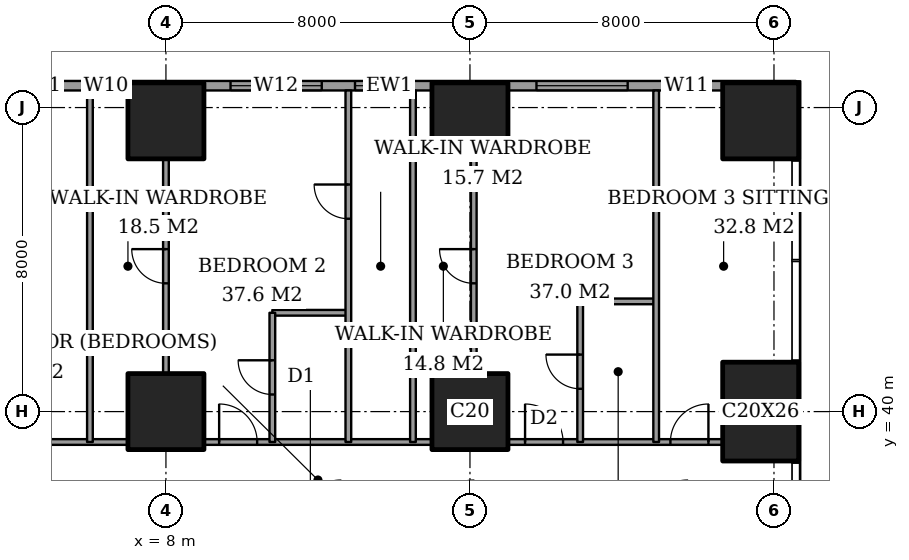
"""IFC4 building model, lengths in metres.
Left out: names, types, materials, properties, quantities, classifications, styles, units other than length and angle.
Written with IfcOpenShell. Run it as: python <this file> out.ifc"""

import sys

from ifc_helpers import new_model, si_unit, direction, frame, frame_2d, origin, origin_2d, place, context, subcontext, project, spatial, rectangle, extrude, element, fill, save


model = new_model("IFC4")
c1 = context("Model", 3, precision=1e-05, world=origin(), true_north=direction((0.0, 1.0)))
c2 = subcontext(c1, "Body", "Model", "MODEL_VIEW")
j1 = project(units=[si_unit("LENGTHUNIT", "METRE"), si_unit("PLANEANGLEUNIT", "RADIAN")], contexts=[c1])
p1 = place(None, origin())
s1 = spatial("IfcSite", under=j1, at=p1, CompositionType="ELEMENT")
p2 = place(p1, origin())
s2 = spatial("IfcBuilding", under=s1, at=p2, CompositionType="ELEMENT")
p3 = place(p2, frame((0.0, 0.0, 128.6)))
s3 = spatial("IfcBuildingStorey", under=s2, at=p3, CompositionType="ELEMENT", Elevation=128.6)
for number, where, z_axis, x_axis in (
    (1, (8.0, 40.0, 0.0), (0.0, 0.0, 1.0), (1.0, 0.0, 0.0)),
    (2, (8.0, 47.65, 0.0), (0.0, 0.0, 1.0), (1.0, 0.0, 0.0)),
    (3, (16.0, 40.0, 0.0), (0.0, 0.0, 1.0), (1.0, 0.0, 0.0)),
    (4, (16.0, 47.65, 0.0), (0.0, 0.0, 1.0), (1.0, 0.0, 0.0)),
):
    element("IfcColumn", number, at=place(p3, frame(where, z_axis=z_axis, x_axis=x_axis)), inside=s3, PredefinedType="COLUMN", context=c2, shape_type="SweptSolid", body=[
        extrude(rectangle(XDim=2.0, YDim=2.0, at=origin_2d()), origin(), (0.0, 0.0, 1.0), 3.6),
    ])
p4 = place(p3, frame((23.65, 40.0, 0.0), z_axis=(0.0, 0.0, 1.0), x_axis=(1.0, 0.0, 0.0)))
e5 = element("IfcColumn", 5, at=p4, inside=s3, PredefinedType="COLUMN", context=c2, shape_type="SweptSolid", body=[
    extrude(rectangle(XDim=2.0, YDim=2.6, at=origin_2d()), origin(), (0.0, 0.0, 1.0), 3.6),
])
p5 = place(p3, frame((23.65, 47.65, 0.0), z_axis=(0.0, 0.0, 1.0), x_axis=(1.0, 0.0, 0.0)))
e6 = element("IfcColumn", 6, at=p5, inside=s3, PredefinedType="COLUMN", context=c2, shape_type="SweptSolid", body=[
    extrude(rectangle(XDim=2.0, YDim=2.0, at=origin_2d()), origin(), (0.0, 0.0, 1.0), 3.6),
])
p6 = place(p3, frame((24.575, 48.575, 0.0), z_axis=(0.0, 0.0, 1.0), x_axis=(-1.0, 0.0, 0.0)))
e7 = element("IfcWall", 7, at=p6, inside=s3, PredefinedType="SOLIDWALL", context=c2, shape_type="SweptSolid", body=[
    extrude(rectangle(XDim=21.4, YDim=0.25, at=frame_2d((10.7, 0.0))), origin(), (0.0, 0.0, 1.0), 3.6),
])
p7 = place(p6, frame((2.275, 0.0, 0.4)))
e8 = element("IfcOpeningElement", 8, at=p7, cuts=e7, PredefinedType="OPENING", context=c2, shape_type="SweptSolid", body=[
    extrude(rectangle(XDim=1.2, YDim=2.2, at=frame_2d((0.6, 1.1))), frame((0.0, 0.135, 0.0), z_axis=(0.0, -1.0, 0.0), x_axis=(1.0, 0.0, 0.0)), (0.0, 0.0, 1.0), 0.27),
])
p8 = place(p6, frame((4.425, 0.0, 0.4)))
e9 = element("IfcOpeningElement", 9, at=p8, cuts=e7, PredefinedType="OPENING", context=c2, shape_type="SweptSolid", body=[
    extrude(rectangle(XDim=2.4, YDim=2.2, at=frame_2d((1.2, 1.1))), frame((0.0, 0.135, 0.0), z_axis=(0.0, -1.0, 0.0), x_axis=(1.0, 0.0, 0.0)), (0.0, 0.0, 1.0), 0.27),
])
p9 = place(p6, frame((10.4, 0.0, 0.4)))
e10 = element("IfcOpeningElement", 10, at=p9, cuts=e7, PredefinedType="OPENING", context=c2, shape_type="SweptSolid", body=[
    extrude(rectangle(XDim=1.2, YDim=2.2, at=frame_2d((0.6, 1.1))), frame((0.0, 0.135, 0.0), z_axis=(0.0, -1.0, 0.0), x_axis=(1.0, 0.0, 0.0)), (0.0, 0.0, 1.0), 0.27),
])
p10 = place(p6, frame((12.475, 0.0, 0.4)))
e11 = element("IfcOpeningElement", 11, at=p10, cuts=e7, PredefinedType="OPENING", context=c2, shape_type="SweptSolid", body=[
    extrude(rectangle(XDim=2.4, YDim=2.2, at=frame_2d((1.2, 1.1))), frame((0.0, 0.135, 0.0), z_axis=(0.0, -1.0, 0.0), x_axis=(1.0, 0.0, 0.0)), (0.0, 0.0, 1.0), 0.27),
])
p11 = place(p6, frame((17.85, 0.0, 0.4)))
e12 = element("IfcOpeningElement", 12, at=p11, cuts=e7, PredefinedType="OPENING", context=c2, shape_type="SweptSolid", body=[
    extrude(rectangle(XDim=0.6, YDim=2.2, at=frame_2d((0.3, 1.1))), frame((0.0, 0.135, 0.0), z_axis=(0.0, -1.0, 0.0), x_axis=(1.0, 0.0, 0.0)), (0.0, 0.0, 1.0), 0.27),
])
p12 = place(p6, frame((19.325, 0.0, 0.4)))
e13 = element("IfcOpeningElement", 13, at=p12, cuts=e7, PredefinedType="OPENING", context=c2, shape_type="SweptSolid", body=[
    extrude(rectangle(XDim=1.2, YDim=2.2, at=frame_2d((0.6, 1.1))), frame((0.0, 0.135, 0.0), z_axis=(0.0, -1.0, 0.0), x_axis=(1.0, 0.0, 0.0)), (0.0, 0.0, 1.0), 0.27),
])
p13 = place(p3, frame((1.35, 39.2, 0.0), z_axis=(0.0, 0.0, 1.0), x_axis=(1.0, 0.0, 0.0)))
e14 = element("IfcWall", 14, at=p13, inside=s3, PredefinedType="PARTITIONING", context=c2, shape_type="SweptSolid", body=[
    extrude(rectangle(XDim=5.65, YDim=0.15, at=frame_2d((2.825, 0.0))), origin(), (0.0, 0.0, 1.0), 3.35),
])
p14 = place(p13, frame((1.825, 0.0, 0.0)))
e15 = element("IfcOpeningElement", 15, at=p14, cuts=e14, PredefinedType="OPENING", context=c2, shape_type="SweptSolid", body=[
    extrude(rectangle(XDim=1.0, YDim=2.1, at=frame_2d((0.5, 1.05))), frame((0.0, 0.085, 0.0), z_axis=(0.0, -1.0, 0.0), x_axis=(1.0, 0.0, 0.0)), (0.0, 0.0, 1.0), 0.17),
])
p15 = place(p3, frame((9.0, 39.2, 0.0), z_axis=(0.0, 0.0, 1.0), x_axis=(1.0, 0.0, 0.0)))
e16 = element("IfcWall", 16, at=p15, inside=s3, PredefinedType="PARTITIONING", context=c2, shape_type="SweptSolid", body=[
    extrude(rectangle(XDim=6.0, YDim=0.15, at=frame_2d((3.0, 0.0))), origin(), (0.0, 0.0, 1.0), 3.35),
])
p16 = place(p15, frame((0.4, 0.0, 0.0)))
e17 = element("IfcOpeningElement", 17, at=p16, cuts=e16, PredefinedType="OPENING", context=c2, shape_type="SweptSolid", body=[
    extrude(rectangle(XDim=1.0, YDim=2.1, at=frame_2d((0.5, 1.05))), frame((0.0, 0.085, 0.0), z_axis=(0.0, -1.0, 0.0), x_axis=(1.0, 0.0, 0.0)), (0.0, 0.0, 1.0), 0.17),
])
p17 = place(p3, frame((17.0, 39.2, 0.0), z_axis=(0.0, 0.0, 1.0), x_axis=(1.0, 0.0, 0.0)))
e18 = element("IfcWall", 18, at=p17, inside=s3, PredefinedType="PARTITIONING", context=c2, shape_type="SweptSolid", body=[
    extrude(rectangle(XDim=5.65, YDim=0.15, at=frame_2d((2.825, 0.0))), origin(), (0.0, 0.0, 1.0), 3.35),
])
p18 = place(p17, frame((0.45, 0.0, 0.0)))
e19 = element("IfcOpeningElement", 19, at=p18, cuts=e18, PredefinedType="OPENING", context=c2, shape_type="SweptSolid", body=[
    extrude(rectangle(XDim=1.0, YDim=2.1, at=frame_2d((0.5, 1.05))), frame((0.0, 0.085, 0.0), z_axis=(0.0, -1.0, 0.0), x_axis=(1.0, 0.0, 0.0)), (0.0, 0.0, 1.0), 0.17),
])
p19 = place(p17, frame((4.275, 0.0, 0.0)))
e20 = element("IfcOpeningElement", 20, at=p19, cuts=e18, PredefinedType="OPENING", context=c2, shape_type="SweptSolid", body=[
    extrude(rectangle(XDim=1.0, YDim=2.1, at=frame_2d((0.5, 1.05))), frame((0.0, 0.085, 0.0), z_axis=(0.0, -1.0, 0.0), x_axis=(1.0, 0.0, 0.0)), (0.0, 0.0, 1.0), 0.17),
])
for number, where, z_axis, x_axis in (
    (21, (10.8, 42.6, 0.0), (0.0, 0.0, 1.0), (1.0, 0.0, 0.0)),
    (22, (18.9, 42.9, 0.0), (0.0, 0.0, 1.0), (1.0, 0.0, 0.0)),
):
    element("IfcWall", number, at=place(p3, frame(where, z_axis=z_axis, x_axis=x_axis)), inside=s3, PredefinedType="PARTITIONING", context=c2, shape_type="SweptSolid", body=[
        extrude(rectangle(XDim=2.0, YDim=0.15, at=frame_2d((1.0, 0.0))), origin(), (0.0, 0.0, 1.0), 3.35),
    ])
p20 = place(p3, frame((6.0, 39.2, 0.0), z_axis=(0.0, 0.0, 1.0), x_axis=(0.0, 1.0, 0.0)))
e23 = element("IfcWall", 23, at=p20, inside=s3, PredefinedType="PARTITIONING", context=c2, shape_type="SweptSolid", body=[
    extrude(rectangle(XDim=9.25, YDim=0.15, at=frame_2d((4.625, 0.0))), origin(), (0.0, 0.0, 1.0), 3.35),
])
p21 = place(p3, frame((8.0, 41.0, 0.0), z_axis=(0.0, 0.0, 1.0), x_axis=(0.0, 1.0, 0.0)))
e24 = element("IfcWall", 24, at=p21, inside=s3, PredefinedType="PARTITIONING", context=c2, shape_type="SweptSolid", body=[
    extrude(rectangle(XDim=5.65, YDim=0.15, at=frame_2d((2.825, 0.0))), origin(), (0.0, 0.0, 1.0), 3.35),
])
p22 = place(p21, frame((2.375, 0.0, 0.0)))
e25 = element("IfcOpeningElement", 25, at=p22, cuts=e24, PredefinedType="OPENING", context=c2, shape_type="SweptSolid", body=[
    extrude(rectangle(XDim=0.9, YDim=2.1, at=frame_2d((0.45, 1.05))), frame((0.0, 0.085, 0.0), z_axis=(0.0, -1.0, 0.0), x_axis=(1.0, 0.0, 0.0)), (0.0, 0.0, 1.0), 0.17),
])
p23 = place(p3, frame((10.8, 39.2, 0.0), z_axis=(0.0, 0.0, 1.0), x_axis=(0.0, 1.0, 0.0)))
e26 = element("IfcWall", 26, at=p23, inside=s3, PredefinedType="PARTITIONING", context=c2, shape_type="SweptSolid", body=[
    extrude(rectangle(XDim=3.4, YDim=0.15, at=frame_2d((1.7, 0.0))), origin(), (0.0, 0.0, 1.0), 3.35),
])
p24 = place(p23, frame((1.25, 0.0, 0.0)))
e27 = element("IfcOpeningElement", 27, at=p24, cuts=e26, PredefinedType="OPENING", context=c2, shape_type="SweptSolid", body=[
    extrude(rectangle(XDim=0.9, YDim=2.1, at=frame_2d((0.45, 1.05))), frame((0.0, 0.085, 0.0), z_axis=(0.0, -1.0, 0.0), x_axis=(1.0, 0.0, 0.0)), (0.0, 0.0, 1.0), 0.17),
])
p25 = place(p3, frame((12.8, 39.2, 0.0), z_axis=(0.0, 0.0, 1.0), x_axis=(0.0, 1.0, 0.0)))
e28 = element("IfcWall", 28, at=p25, inside=s3, PredefinedType="PARTITIONING", context=c2, shape_type="SweptSolid", body=[
    extrude(rectangle(XDim=9.25, YDim=0.15, at=frame_2d((4.625, 0.0))), origin(), (0.0, 0.0, 1.0), 3.35),
])
p26 = place(p25, frame((5.875, 0.0, 0.0)))
e29 = element("IfcOpeningElement", 29, at=p26, cuts=e28, PredefinedType="OPENING", context=c2, shape_type="SweptSolid", body=[
    extrude(rectangle(XDim=0.9, YDim=2.1, at=frame_2d((0.45, 1.05))), frame((0.0, 0.085, 0.0), z_axis=(0.0, -1.0, 0.0), x_axis=(1.0, 0.0, 0.0)), (0.0, 0.0, 1.0), 0.17),
])
p27 = place(p3, frame((14.5, 39.2, 0.0), z_axis=(0.0, 0.0, 1.0), x_axis=(0.0, 1.0, 0.0)))
e30 = element("IfcWall", 30, at=p27, inside=s3, PredefinedType="PARTITIONING", context=c2, shape_type="SweptSolid", body=[
    extrude(rectangle(XDim=9.25, YDim=0.15, at=frame_2d((4.625, 0.0))), origin(), (0.0, 0.0, 1.0), 3.35),
])
p28 = place(p3, frame((16.1, 41.0, 0.0), z_axis=(0.0, 0.0, 1.0), x_axis=(0.0, 1.0, 0.0)))
e31 = element("IfcWall", 31, at=p28, inside=s3, PredefinedType="PARTITIONING", context=c2, shape_type="SweptSolid", body=[
    extrude(rectangle(XDim=5.65, YDim=0.15, at=frame_2d((2.825, 0.0))), origin(), (0.0, 0.0, 1.0), 3.35),
])
p29 = place(p28, frame((2.375, 0.0, 0.0)))
e32 = element("IfcOpeningElement", 32, at=p29, cuts=e31, PredefinedType="OPENING", context=c2, shape_type="SweptSolid", body=[
    extrude(rectangle(XDim=0.9, YDim=2.1, at=frame_2d((0.45, 1.05))), frame((0.0, 0.085, 0.0), z_axis=(0.0, -1.0, 0.0), x_axis=(1.0, 0.0, 0.0)), (0.0, 0.0, 1.0), 0.17),
])
p30 = place(p3, frame((18.9, 39.2, 0.0), z_axis=(0.0, 0.0, 1.0), x_axis=(0.0, 1.0, 0.0)))
e33 = element("IfcWall", 33, at=p30, inside=s3, PredefinedType="PARTITIONING", context=c2, shape_type="SweptSolid", body=[
    extrude(rectangle(XDim=3.7, YDim=0.15, at=frame_2d((1.85, 0.0))), origin(), (0.0, 0.0, 1.0), 3.35),
])
p31 = place(p30, frame((1.4, 0.0, 0.0)))
e34 = element("IfcOpeningElement", 34, at=p31, cuts=e33, PredefinedType="OPENING", context=c2, shape_type="SweptSolid", body=[
    extrude(rectangle(XDim=0.9, YDim=2.1, at=frame_2d((0.45, 1.05))), frame((0.0, 0.085, 0.0), z_axis=(0.0, -1.0, 0.0), x_axis=(1.0, 0.0, 0.0)), (0.0, 0.0, 1.0), 0.17),
])
p32 = place(p3, frame((20.9, 39.2, 0.0), z_axis=(0.0, 0.0, 1.0), x_axis=(0.0, 1.0, 0.0)))
e35 = element("IfcWall", 35, at=p32, inside=s3, PredefinedType="PARTITIONING", context=c2, shape_type="SweptSolid", body=[
    extrude(rectangle(XDim=9.25, YDim=0.15, at=frame_2d((4.625, 0.0))), origin(), (0.0, 0.0, 1.0), 3.35),
])
p33 = place(p7, origin())
e36 = element("IfcWindow", 36, at=p33, inside=s3, PartitioningType="SINGLE_PANEL", PredefinedType="WINDOW", context=c2, shape_type="SweptSolid", body=[
    extrude(rectangle(XDim=1.2, YDim=2.2, at=frame_2d((0.6, 1.1))), frame((0.0, 0.03, 0.0), z_axis=(0.0, -1.0, 0.0), x_axis=(1.0, 0.0, 0.0)), (0.0, 0.0, 1.0), 0.06),
])
fill(e8, e36)
p34 = place(p8, origin())
e37 = element("IfcWindow", 37, at=p34, inside=s3, PartitioningType="SINGLE_PANEL", PredefinedType="WINDOW", context=c2, shape_type="SweptSolid", body=[
    extrude(rectangle(XDim=2.4, YDim=2.2, at=frame_2d((1.2, 1.1))), frame((0.0, 0.03, 0.0), z_axis=(0.0, -1.0, 0.0), x_axis=(1.0, 0.0, 0.0)), (0.0, 0.0, 1.0), 0.06),
])
fill(e9, e37)
p35 = place(p9, origin())
e38 = element("IfcWindow", 38, at=p35, inside=s3, PartitioningType="SINGLE_PANEL", PredefinedType="WINDOW", context=c2, shape_type="SweptSolid", body=[
    extrude(rectangle(XDim=1.2, YDim=2.2, at=frame_2d((0.6, 1.1))), frame((0.0, 0.03, 0.0), z_axis=(0.0, -1.0, 0.0), x_axis=(1.0, 0.0, 0.0)), (0.0, 0.0, 1.0), 0.06),
])
fill(e10, e38)
p36 = place(p10, origin())
e39 = element("IfcWindow", 39, at=p36, inside=s3, PartitioningType="SINGLE_PANEL", PredefinedType="WINDOW", context=c2, shape_type="SweptSolid", body=[
    extrude(rectangle(XDim=2.4, YDim=2.2, at=frame_2d((1.2, 1.1))), frame((0.0, 0.03, 0.0), z_axis=(0.0, -1.0, 0.0), x_axis=(1.0, 0.0, 0.0)), (0.0, 0.0, 1.0), 0.06),
])
fill(e11, e39)
p37 = place(p11, origin())
e40 = element("IfcWindow", 40, at=p37, inside=s3, PartitioningType="SINGLE_PANEL", PredefinedType="WINDOW", context=c2, shape_type="SweptSolid", body=[
    extrude(rectangle(XDim=0.6, YDim=2.2, at=frame_2d((0.3, 1.1))), frame((0.0, 0.03, 0.0), z_axis=(0.0, -1.0, 0.0), x_axis=(1.0, 0.0, 0.0)), (0.0, 0.0, 1.0), 0.06),
])
fill(e12, e40)
p38 = place(p12, origin())
e41 = element("IfcWindow", 41, at=p38, inside=s3, PartitioningType="SINGLE_PANEL", PredefinedType="WINDOW", context=c2, shape_type="SweptSolid", body=[
    extrude(rectangle(XDim=1.2, YDim=2.2, at=frame_2d((0.6, 1.1))), frame((0.0, 0.03, 0.0), z_axis=(0.0, -1.0, 0.0), x_axis=(1.0, 0.0, 0.0)), (0.0, 0.0, 1.0), 0.06),
])
fill(e13, e41)
p39 = place(p22, origin())
e42 = element("IfcDoor", 42, at=p39, inside=s3, OperationType="SINGLE_SWING_LEFT", PredefinedType="DOOR", context=c2, shape_type="SweptSolid", body=[
    extrude(rectangle(XDim=0.9, YDim=2.1, at=frame_2d((0.45, 1.05))), frame((0.0, 0.025, 0.0), z_axis=(0.0, -1.0, 0.0), x_axis=(1.0, 0.0, 0.0)), (0.0, 0.0, 1.0), 0.05),
])
fill(e25, e42)
p40 = place(p24, origin())
e43 = element("IfcDoor", 43, at=p40, inside=s3, OperationType="SINGLE_SWING_LEFT", PredefinedType="DOOR", context=c2, shape_type="SweptSolid", body=[
    extrude(rectangle(XDim=0.9, YDim=2.1, at=frame_2d((0.45, 1.05))), frame((0.0, 0.025, 0.0), z_axis=(0.0, -1.0, 0.0), x_axis=(1.0, 0.0, 0.0)), (0.0, 0.0, 1.0), 0.05),
])
fill(e27, e43)
p41 = place(p16, origin())
e44 = element("IfcDoor", 44, at=p41, inside=s3, OperationType="SINGLE_SWING_RIGHT", PredefinedType="DOOR", context=c2, shape_type="SweptSolid", body=[
    extrude(rectangle(XDim=1.0, YDim=2.1, at=frame_2d((0.5, 1.05))), frame((0.0, 0.025, 0.0), z_axis=(0.0, -1.0, 0.0), x_axis=(1.0, 0.0, 0.0)), (0.0, 0.0, 1.0), 0.05),
])
fill(e17, e44)
p42 = place(p26, origin())
e45 = element("IfcDoor", 45, at=p42, inside=s3, OperationType="SINGLE_SWING_LEFT", PredefinedType="DOOR", context=c2, shape_type="SweptSolid", body=[
    extrude(rectangle(XDim=0.9, YDim=2.1, at=frame_2d((0.45, 1.05))), frame((0.0, 0.025, 0.0), z_axis=(0.0, -1.0, 0.0), x_axis=(1.0, 0.0, 0.0)), (0.0, 0.0, 1.0), 0.05),
])
fill(e29, e45)
p43 = place(p29, origin())
e46 = element("IfcDoor", 46, at=p43, inside=s3, OperationType="SINGLE_SWING_LEFT", PredefinedType="DOOR", context=c2, shape_type="SweptSolid", body=[
    extrude(rectangle(XDim=0.9, YDim=2.1, at=frame_2d((0.45, 1.05))), frame((0.0, 0.025, 0.0), z_axis=(0.0, -1.0, 0.0), x_axis=(1.0, 0.0, 0.0)), (0.0, 0.0, 1.0), 0.05),
])
fill(e32, e46)
p44 = place(p31, origin())
e47 = element("IfcDoor", 47, at=p44, inside=s3, OperationType="SINGLE_SWING_LEFT", PredefinedType="DOOR", context=c2, shape_type="SweptSolid", body=[
    extrude(rectangle(XDim=0.9, YDim=2.1, at=frame_2d((0.45, 1.05))), frame((0.0, 0.025, 0.0), z_axis=(0.0, -1.0, 0.0), x_axis=(1.0, 0.0, 0.0)), (0.0, 0.0, 1.0), 0.05),
])
fill(e34, e47)
p45 = place(p18, origin())
e48 = element("IfcDoor", 48, at=p45, inside=s3, OperationType="SINGLE_SWING_RIGHT", PredefinedType="DOOR", context=c2, shape_type="SweptSolid", body=[
    extrude(rectangle(XDim=1.0, YDim=2.1, at=frame_2d((0.5, 1.05))), frame((0.0, 0.025, 0.0), z_axis=(0.0, -1.0, 0.0), x_axis=(1.0, 0.0, 0.0)), (0.0, 0.0, 1.0), 0.05),
])
fill(e19, e48)
p46 = place(p19, origin())
e49 = element("IfcDoor", 49, at=p46, inside=s3, OperationType="SINGLE_SWING_LEFT", PredefinedType="DOOR", context=c2, shape_type="SweptSolid", body=[
    extrude(rectangle(XDim=1.0, YDim=2.1, at=frame_2d((0.5, 1.05))), frame((0.0, 0.025, 0.0), z_axis=(0.0, -1.0, 0.0), x_axis=(1.0, 0.0, 0.0)), (0.0, 0.0, 1.0), 0.05),
])
fill(e20, e49)
save(model, sys.argv[1])
